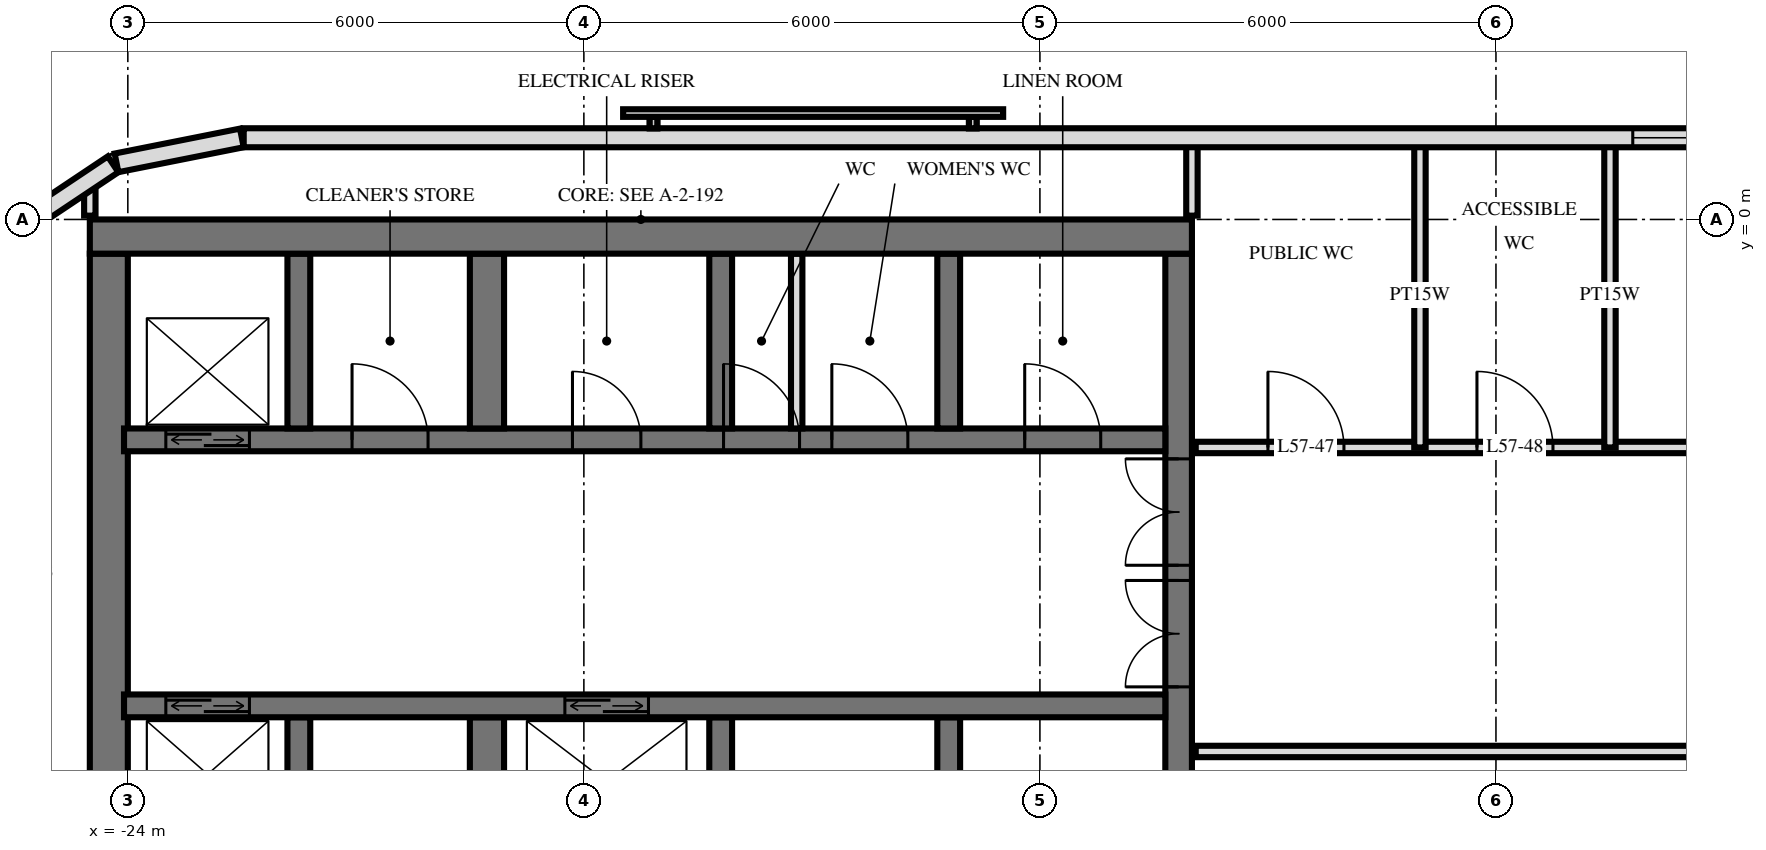
"""IFC4 building model, lengths in metres.
Left out: names, types, materials, properties, quantities, classifications, styles, units other than length and angle.
Written with IfcOpenShell. Run it as: python <this file> out.ifc"""

import sys

from ifc_helpers import new_model, si_unit, direction, frame, frame_2d, origin, place, context, subcontext, project, spatial, rectangle, extrude, element, fill, save


model = new_model("IFC4")
c1 = context("Model", 3, precision=1e-05, world=origin(), true_north=direction((0.0, 1.0)))
c2 = subcontext(c1, "Body", "Model", "MODEL_VIEW")
j1 = project(units=[si_unit("LENGTHUNIT", "METRE"), si_unit("PLANEANGLEUNIT", "RADIAN")], contexts=[c1])
p1 = place(None, origin())
s1 = spatial("IfcSite", under=j1, at=p1, CompositionType="ELEMENT")
p2 = place(p1, origin())
s2 = spatial("IfcBuilding", under=s1, at=p2, CompositionType="ELEMENT")
p3 = place(p2, frame((0.0, 0.0, 218.6)))
s3 = spatial("IfcBuildingStorey", under=s2, at=p3, CompositionType="ELEMENT", Elevation=218.6)
p4 = place(p3, frame((-24.5, -0.225, 0.0), z_axis=(0.0, 0.0, 1.0), x_axis=(1.0, 0.0, 0.0)))
e1 = element("IfcWall", 1, at=p4, inside=s3, PredefinedType="SHEAR", context=c2, shape_type="SweptSolid", body=[
    extrude(rectangle(XDim=14.5, YDim=0.45, at=frame_2d((7.25, 0.0))), origin(), (0.0, 0.0, 1.0), 3.5),
])
p5 = place(p3, frame((-10.175, -14.55, 0.0), z_axis=(0.0, 0.0, 1.0), x_axis=(0.0, 1.0, 0.0)))
e2 = element("IfcWall", 2, at=p5, inside=s3, PredefinedType="SHEAR", context=c2, shape_type="SweptSolid", body=[
    extrude(rectangle(XDim=14.1, YDim=0.35, at=frame_2d((7.05, 0.0))), origin(), (0.0, 0.0, 1.0), 3.5),
])
p6 = place(p5, frame((8.4, 0.0, 0.0)))
e3 = element("IfcOpeningElement", 3, at=p6, cuts=e2, PredefinedType="OPENING", context=c2, shape_type="SweptSolid", body=[
    extrude(rectangle(XDim=1.4, YDim=2.4, at=frame_2d((0.7, 1.2))), frame((0.0, 0.185, 0.0), z_axis=(0.0, -1.0, 0.0), x_axis=(1.0, 0.0, 0.0)), (0.0, 0.0, 1.0), 0.37),
])
p7 = place(p5, frame((10.0, 0.0, 0.0)))
e4 = element("IfcOpeningElement", 4, at=p7, cuts=e2, PredefinedType="OPENING", context=c2, shape_type="SweptSolid", body=[
    extrude(rectangle(XDim=1.4, YDim=2.4, at=frame_2d((0.7, 1.2))), frame((0.0, 0.185, 0.0), z_axis=(0.0, -1.0, 0.0), x_axis=(1.0, 0.0, 0.0)), (0.0, 0.0, 1.0), 0.37),
])
p8 = place(p5, frame((4.0, 0.0, 0.0)))
e5 = element("IfcOpeningElement", 5, at=p8, cuts=e2, PredefinedType="OPENING", context=c2, shape_type="SweptSolid", body=[
    extrude(rectangle(XDim=1.2, YDim=2.1, at=frame_2d((0.6, 1.05))), frame((0.0, 0.185, 0.0), z_axis=(0.0, -1.0, 0.0), x_axis=(1.0, 0.0, 0.0)), (0.0, 0.0, 1.0), 0.37),
])
p9 = place(p3, frame((-24.25, -14.55, 0.0), z_axis=(0.0, 0.0, 1.0), x_axis=(0.0, 1.0, 0.0)))
e6 = element("IfcWall", 6, at=p9, inside=s3, PredefinedType="SHEAR", context=c2, shape_type="SweptSolid", body=[
    extrude(rectangle(XDim=14.1, YDim=0.5, at=frame_2d((7.05, 0.0))), origin(), (0.0, 0.0, 1.0), 3.5),
])
p10 = place(p3, frame((-24.05, -2.9, 0.0), z_axis=(0.0, 0.0, 1.0), x_axis=(1.0, 0.0, 0.0)))
e7 = element("IfcWall", 7, at=p10, inside=s3, PredefinedType="SHEAR", context=c2, shape_type="SweptSolid", body=[
    extrude(rectangle(XDim=13.7, YDim=0.3, at=frame_2d((6.85, 0.0))), origin(), (0.0, 0.0, 1.0), 3.5),
])
p11 = place(p10, frame((0.55, 0.0, 0.0)))
e8 = element("IfcOpeningElement", 8, at=p11, cuts=e7, PredefinedType="OPENING", context=c2, shape_type="SweptSolid", body=[
    extrude(rectangle(XDim=1.1, YDim=2.1, at=frame_2d((0.55, 1.05))), frame((0.0, 0.16, 0.0), z_axis=(0.0, -1.0, 0.0), x_axis=(1.0, 0.0, 0.0)), (0.0, 0.0, 1.0), 0.32),
])
p12 = place(p10, frame((5.9, 0.0, 0.0)))
e9 = element("IfcOpeningElement", 9, at=p12, cuts=e7, PredefinedType="OPENING", context=c2, shape_type="SweptSolid", body=[
    extrude(rectangle(XDim=0.9, YDim=2.1, at=frame_2d((0.45, 1.05))), frame((0.0, 0.16, 0.0), z_axis=(0.0, -1.0, 0.0), x_axis=(1.0, 0.0, 0.0)), (0.0, 0.0, 1.0), 0.32),
])
p13 = place(p10, frame((11.85, 0.0, 0.0)))
e10 = element("IfcOpeningElement", 10, at=p13, cuts=e7, PredefinedType="OPENING", context=c2, shape_type="SweptSolid", body=[
    extrude(rectangle(XDim=1.0, YDim=2.1, at=frame_2d((0.5, 1.05))), frame((0.0, 0.16, 0.0), z_axis=(0.0, -1.0, 0.0), x_axis=(1.0, 0.0, 0.0)), (0.0, 0.0, 1.0), 0.32),
])
p14 = place(p10, frame((9.312, 0.0, 0.0)))
e11 = element("IfcOpeningElement", 11, at=p14, cuts=e7, PredefinedType="OPENING", context=c2, shape_type="SweptSolid", body=[
    extrude(rectangle(XDim=1.0, YDim=2.1, at=frame_2d((0.5, 1.05))), frame((0.0, 0.16, 0.0), z_axis=(0.0, -1.0, 0.0), x_axis=(1.0, 0.0, 0.0)), (0.0, 0.0, 1.0), 0.32),
])
p15 = place(p10, frame((7.887, 0.0, 0.0)))
e12 = element("IfcOpeningElement", 12, at=p15, cuts=e7, PredefinedType="OPENING", context=c2, shape_type="SweptSolid", body=[
    extrude(rectangle(XDim=1.0, YDim=2.1, at=frame_2d((0.5, 1.05))), frame((0.0, 0.16, 0.0), z_axis=(0.0, -1.0, 0.0), x_axis=(1.0, 0.0, 0.0)), (0.0, 0.0, 1.0), 0.32),
])
p16 = place(p10, frame((3.0, 0.0, 0.0)))
e13 = element("IfcOpeningElement", 13, at=p16, cuts=e7, PredefinedType="OPENING", context=c2, shape_type="SweptSolid", body=[
    extrude(rectangle(XDim=1.0, YDim=2.1, at=frame_2d((0.5, 1.05))), frame((0.0, 0.16, 0.0), z_axis=(0.0, -1.0, 0.0), x_axis=(1.0, 0.0, 0.0)), (0.0, 0.0, 1.0), 0.32),
])
p17 = place(p3, frame((-24.05, -6.4, 0.0), z_axis=(0.0, 0.0, 1.0), x_axis=(1.0, 0.0, 0.0)))
e14 = element("IfcWall", 14, at=p17, inside=s3, PredefinedType="SHEAR", context=c2, shape_type="SweptSolid", body=[
    extrude(rectangle(XDim=13.7, YDim=0.3, at=frame_2d((6.85, 0.0))), origin(), (0.0, 0.0, 1.0), 3.5),
])
p18 = place(p17, frame((0.55, 0.0, 0.0)))
e15 = element("IfcOpeningElement", 15, at=p18, cuts=e14, PredefinedType="OPENING", context=c2, shape_type="SweptSolid", body=[
    extrude(rectangle(XDim=1.1, YDim=2.1, at=frame_2d((0.55, 1.05))), frame((0.0, 0.16, 0.0), z_axis=(0.0, -1.0, 0.0), x_axis=(1.0, 0.0, 0.0)), (0.0, 0.0, 1.0), 0.32),
])
p19 = place(p17, frame((5.8, 0.0, 0.0)))
e16 = element("IfcOpeningElement", 16, at=p19, cuts=e14, PredefinedType="OPENING", context=c2, shape_type="SweptSolid", body=[
    extrude(rectangle(XDim=1.1, YDim=2.1, at=frame_2d((0.55, 1.05))), frame((0.0, 0.16, 0.0), z_axis=(0.0, -1.0, 0.0), x_axis=(1.0, 0.0, 0.0)), (0.0, 0.0, 1.0), 0.32),
])
for number, where, z_axis, x_axis in (
    (17, (-13.2, -2.75, 0.0), (0.0, 0.0, 1.0), (0.0, 1.0, 0.0)),
    (18, (-13.2, -8.85, 0.0), (0.0, 0.0, 1.0), (0.0, 1.0, 0.0)),
    (19, (-16.2, -2.75, 0.0), (0.0, 0.0, 1.0), (0.0, 1.0, 0.0)),
    (20, (-16.2, -8.85, 0.0), (0.0, 0.0, 1.0), (0.0, 1.0, 0.0)),
):
    element("IfcWall", number, at=place(p3, frame(where, z_axis=z_axis, x_axis=x_axis)), inside=s3, PredefinedType="SHEAR", context=c2, shape_type="SweptSolid", body=[
        extrude(rectangle(XDim=2.3, YDim=0.3, at=frame_2d((1.15, 0.0))), origin(), (0.0, 0.0, 1.0), 3.5),
    ])
for number, where, z_axis, x_axis in (
    (21, (-19.275, -2.75, 0.0), (0.0, 0.0, 1.0), (0.0, 1.0, 0.0)),
    (22, (-19.275, -8.85, 0.0), (0.0, 0.0, 1.0), (0.0, 1.0, 0.0)),
):
    element("IfcWall", number, at=place(p3, frame(where, z_axis=z_axis, x_axis=x_axis)), inside=s3, PredefinedType="SHEAR", context=c2, shape_type="SweptSolid", body=[
        extrude(rectangle(XDim=2.3, YDim=0.45, at=frame_2d((1.15, 0.0))), origin(), (0.0, 0.0, 1.0), 3.5),
    ])
for number, where, z_axis, x_axis in (
    (23, (-21.75, -2.75, 0.0), (0.0, 0.0, 1.0), (0.0, 1.0, 0.0)),
    (24, (-21.75, -8.85, 0.0), (0.0, 0.0, 1.0), (0.0, 1.0, 0.0)),
):
    element("IfcWall", number, at=place(p3, frame(where, z_axis=z_axis, x_axis=x_axis)), inside=s3, PredefinedType="SHEAR", context=c2, shape_type="SweptSolid", body=[
        extrude(rectangle(XDim=2.3, YDim=0.3, at=frame_2d((1.15, 0.0))), origin(), (0.0, 0.0, 1.0), 3.5),
    ])
p20 = place(p3, frame((22.475, 1.075, 0.0), z_axis=(0.0, 0.0, 1.0), x_axis=(-1.0, 0.0, 0.0)))
e25 = element("IfcWall", 25, at=p20, inside=s3, PredefinedType="SOLIDWALL", context=c2, shape_type="SweptSolid", body=[
    extrude(rectangle(XDim=44.951, YDim=0.25, at=frame_2d((22.475, 0.0))), origin(), (0.0, 0.0, 1.0), 3.22),
])
p21 = place(p20, frame((15.275, 0.0, 0.9)))
e26 = element("IfcOpeningElement", 26, at=p21, cuts=e25, PredefinedType="OPENING", context=c2, shape_type="SweptSolid", body=[
    extrude(rectangle(XDim=2.4, YDim=1.5, at=frame_2d((1.2, 0.75))), frame((0.0, 0.135, 0.0), z_axis=(0.0, -1.0, 0.0), x_axis=(1.0, 0.0, 0.0)), (0.0, 0.0, 1.0), 0.27),
])
p22 = place(p20, frame((18.275, 0.0, 0.9)))
e27 = element("IfcOpeningElement", 27, at=p22, cuts=e25, PredefinedType="OPENING", context=c2, shape_type="SweptSolid", body=[
    extrude(rectangle(XDim=2.4, YDim=1.5, at=frame_2d((1.2, 0.75))), frame((0.0, 0.135, 0.0), z_axis=(0.0, -1.0, 0.0), x_axis=(1.0, 0.0, 0.0)), (0.0, 0.0, 1.0), 0.27),
])
p23 = place(p20, frame((21.275, 0.0, 0.9)))
e28 = element("IfcOpeningElement", 28, at=p23, cuts=e25, PredefinedType="OPENING", context=c2, shape_type="SweptSolid", body=[
    extrude(rectangle(XDim=2.4, YDim=1.5, at=frame_2d((1.2, 0.75))), frame((0.0, 0.135, 0.0), z_axis=(0.0, -1.0, 0.0), x_axis=(1.0, 0.0, 0.0)), (0.0, 0.0, 1.0), 0.27),
])
p24 = place(p20, frame((24.275, 0.0, 0.9)))
e29 = element("IfcOpeningElement", 29, at=p24, cuts=e25, PredefinedType="OPENING", context=c2, shape_type="SweptSolid", body=[
    extrude(rectangle(XDim=2.4, YDim=1.5, at=frame_2d((1.2, 0.75))), frame((0.0, 0.135, 0.0), z_axis=(0.0, -1.0, 0.0), x_axis=(1.0, 0.0, 0.0)), (0.0, 0.0, 1.0), 0.27),
])
p25 = place(p3, frame((-22.5, 1.073, 0.0), z_axis=(0.0, 0.0, 1.0), x_axis=(-0.980803419081, -0.194999110559, 0.0)))
e30 = element("IfcWall", 30, at=p25, inside=s3, PredefinedType="SOLIDWALL", context=c2, shape_type="SweptSolid", body=[
    extrude(rectangle(XDim=1.681, YDim=0.25, at=frame_2d((0.841, 0.0))), origin(), (0.0, 0.0, 1.0), 3.22),
])
p26 = place(p3, frame((-24.194, 0.726, 0.0), z_axis=(0.0, 0.0, 1.0), x_axis=(-0.831482937015, -0.55555029066, 0.0)))
e31 = element("IfcWall", 31, at=p26, inside=s3, PredefinedType="SOLIDWALL", context=c2, shape_type="SweptSolid", body=[
    extrude(rectangle(XDim=1.656, YDim=0.25, at=frame_2d((0.828, 0.0))), origin(), (0.0, 0.0, 1.0), 3.22),
])
p27 = place(p3, frame((-15.2, -2.75, 0.0), z_axis=(0.0, 0.0, 1.0), x_axis=(0.0, 1.0, 0.0)))
e32 = element("IfcWall", 32, at=p27, inside=s3, PredefinedType="PARTITIONING", context=c2, shape_type="SweptSolid", body=[
    extrude(rectangle(XDim=2.3, YDim=0.15, at=frame_2d((1.15, 0.0))), origin(), (0.0, 0.0, 1.0), 3.2),
])
for number, where, z_axis, x_axis in (
    (33, (-4.5, -3.0, 0.0), (0.0, 0.0, 1.0), (0.0, 1.0, 0.0)),
    (34, (-7.0, -3.0, 0.0), (0.0, 0.0, 1.0), (0.0, 1.0, 0.0)),
):
    element("IfcWall", number, at=place(p3, frame(where, z_axis=z_axis, x_axis=x_axis)), inside=s3, PredefinedType="PLUMBINGWALL", context=c2, shape_type="SweptSolid", body=[
        extrude(rectangle(XDim=4.02, YDim=0.15, at=frame_2d((2.01, 0.0))), origin(), (0.0, 0.0, 1.0), 3.22),
    ])
p28 = place(p3, frame((-10.0, 0.05, 0.0), z_axis=(0.0, 0.0, 1.0), x_axis=(0.0, 1.0, 0.0)))
e35 = element("IfcWall", 35, at=p28, inside=s3, PredefinedType="PLUMBINGWALL", context=c2, shape_type="SweptSolid", body=[
    extrude(rectangle(XDim=0.97, YDim=0.15, at=frame_2d((0.485, 0.0))), origin(), (0.0, 0.0, 1.0), 3.22),
])
p29 = place(p3, frame((-24.5, 0.05, 0.0), z_axis=(0.0, 0.0, 1.0), x_axis=(0.0, 1.0, 0.0)))
e36 = element("IfcWall", 36, at=p29, inside=s3, PredefinedType="PARTITIONING", context=c2, shape_type="SweptSolid", body=[
    extrude(rectangle(XDim=0.405, YDim=0.15, at=frame_2d((0.203, 0.0))), origin(), (0.0, 0.0, 1.0), 3.22),
])
p30 = place(p3, frame((-9.95, -7.0, 0.0), z_axis=(0.0, 0.0, 1.0), x_axis=(1.0, 0.0, 0.0)))
e37 = element("IfcWall", 37, at=p30, inside=s3, PredefinedType="PARTITIONING", context=c2, shape_type="SweptSolid", body=[
    extrude(rectangle(XDim=19.9, YDim=0.15, at=frame_2d((9.95, 0.0))), origin(), (0.0, 0.0, 1.0), 3.22),
])
p31 = place(p30, frame((9.45, 0.0, 0.0)))
e38 = element("IfcOpeningElement", 38, at=p31, cuts=e37, PredefinedType="OPENING", context=c2, shape_type="SweptSolid", body=[
    extrude(rectangle(XDim=1.0, YDim=2.1, at=frame_2d((0.5, 1.05))), frame((0.0, 0.085, 0.0), z_axis=(0.0, -1.0, 0.0), x_axis=(1.0, 0.0, 0.0)), (0.0, 0.0, 1.0), 0.17),
])
p32 = place(p30, frame((15.45, 0.0, 0.0)))
e39 = element("IfcOpeningElement", 39, at=p32, cuts=e37, PredefinedType="OPENING", context=c2, shape_type="SweptSolid", body=[
    extrude(rectangle(XDim=1.0, YDim=2.1, at=frame_2d((0.5, 1.05))), frame((0.0, 0.085, 0.0), z_axis=(0.0, -1.0, 0.0), x_axis=(1.0, 0.0, 0.0)), (0.0, 0.0, 1.0), 0.17),
])
p33 = place(p3, frame((-9.95, -3.0, 0.0), z_axis=(0.0, 0.0, 1.0), x_axis=(1.0, 0.0, 0.0)))
e40 = element("IfcWall", 40, at=p33, inside=s3, PredefinedType="PARTITIONING", context=c2, shape_type="SweptSolid", body=[
    extrude(rectangle(XDim=19.9, YDim=0.15, at=frame_2d((9.95, 0.0))), origin(), (0.0, 0.0, 1.0), 3.22),
])
p34 = place(p33, frame((0.95, 0.0, 0.0)))
e41 = element("IfcOpeningElement", 41, at=p34, cuts=e40, PredefinedType="OPENING", context=c2, shape_type="SweptSolid", body=[
    extrude(rectangle(XDim=1.0, YDim=2.1, at=frame_2d((0.5, 1.05))), frame((0.0, 0.085, 0.0), z_axis=(0.0, -1.0, 0.0), x_axis=(1.0, 0.0, 0.0)), (0.0, 0.0, 1.0), 0.17),
])
p35 = place(p33, frame((3.7, 0.0, 0.0)))
e42 = element("IfcOpeningElement", 42, at=p35, cuts=e40, PredefinedType="OPENING", context=c2, shape_type="SweptSolid", body=[
    extrude(rectangle(XDim=1.0, YDim=2.1, at=frame_2d((0.5, 1.05))), frame((0.0, 0.085, 0.0), z_axis=(0.0, -1.0, 0.0), x_axis=(1.0, 0.0, 0.0)), (0.0, 0.0, 1.0), 0.17),
])
p36 = place(p33, frame((7.95, 0.0, 0.0)))
e43 = element("IfcOpeningElement", 43, at=p36, cuts=e40, PredefinedType="OPENING", context=c2, shape_type="SweptSolid", body=[
    extrude(rectangle(XDim=1.0, YDim=2.1, at=frame_2d((0.5, 1.05))), frame((0.0, 0.085, 0.0), z_axis=(0.0, -1.0, 0.0), x_axis=(1.0, 0.0, 0.0)), (0.0, 0.0, 1.0), 0.17),
])
p37 = place(p33, frame((15.2, 0.0, 0.0)))
e44 = element("IfcOpeningElement", 44, at=p37, cuts=e40, PredefinedType="OPENING", context=c2, shape_type="SweptSolid", body=[
    extrude(rectangle(XDim=1.0, YDim=2.1, at=frame_2d((0.5, 1.05))), frame((0.0, 0.085, 0.0), z_axis=(0.0, -1.0, 0.0), x_axis=(1.0, 0.0, 0.0)), (0.0, 0.0, 1.0), 0.17),
])
p38 = place(p24, origin())
e45 = element("IfcWindow", 45, at=p38, inside=s3, PartitioningType="SINGLE_PANEL", PredefinedType="WINDOW", context=c2, shape_type="SweptSolid", body=[
    extrude(rectangle(XDim=2.4, YDim=1.5, at=frame_2d((1.2, 0.75))), frame((0.0, 0.03, 0.0), z_axis=(0.0, -1.0, 0.0), x_axis=(1.0, 0.0, 0.0)), (0.0, 0.0, 1.0), 0.06),
])
fill(e29, e45)
p39 = place(p11, origin())
e46 = element("IfcDoor", 46, at=p39, inside=s3, OperationType="DOUBLE_DOOR_SLIDING", PredefinedType="USERDEFINED", context=c2, shape_type="SweptSolid", body=[
    extrude(rectangle(XDim=1.1, YDim=2.1, at=frame_2d((0.55, 1.05))), frame((0.0, 0.025, 0.0), z_axis=(0.0, -1.0, 0.0), x_axis=(1.0, 0.0, 0.0)), (0.0, 0.0, 1.0), 0.05),
])
fill(e8, e46)
p40 = place(p18, origin())
e47 = element("IfcDoor", 47, at=p40, inside=s3, OperationType="DOUBLE_DOOR_SLIDING", PredefinedType="USERDEFINED", context=c2, shape_type="SweptSolid", body=[
    extrude(rectangle(XDim=1.1, YDim=2.1, at=frame_2d((0.55, 1.05))), frame((0.0, 0.025, 0.0), z_axis=(0.0, -1.0, 0.0), x_axis=(1.0, 0.0, 0.0)), (0.0, 0.0, 1.0), 0.05),
])
fill(e15, e47)
p41 = place(p19, origin())
e48 = element("IfcDoor", 48, at=p41, inside=s3, OperationType="DOUBLE_DOOR_SLIDING", PredefinedType="USERDEFINED", context=c2, shape_type="SweptSolid", body=[
    extrude(rectangle(XDim=1.1, YDim=2.1, at=frame_2d((0.55, 1.05))), frame((0.0, 0.025, 0.0), z_axis=(0.0, -1.0, 0.0), x_axis=(1.0, 0.0, 0.0)), (0.0, 0.0, 1.0), 0.05),
])
fill(e16, e48)
p42 = place(p6, origin())
e49 = element("IfcDoor", 49, at=p42, inside=s3, OperationType="DOUBLE_DOOR_SINGLE_SWING", PredefinedType="DOOR", context=c2, shape_type="SweptSolid", body=[
    extrude(rectangle(XDim=1.4, YDim=2.4, at=frame_2d((0.7, 1.2))), frame((0.0, 0.025, 0.0), z_axis=(0.0, -1.0, 0.0), x_axis=(1.0, 0.0, 0.0)), (0.0, 0.0, 1.0), 0.05),
])
fill(e3, e49)
p43 = place(p7, origin())
e50 = element("IfcDoor", 50, at=p43, inside=s3, OperationType="DOUBLE_DOOR_SINGLE_SWING", PredefinedType="DOOR", context=c2, shape_type="SweptSolid", body=[
    extrude(rectangle(XDim=1.4, YDim=2.4, at=frame_2d((0.7, 1.2))), frame((0.0, 0.025, 0.0), z_axis=(0.0, -1.0, 0.0), x_axis=(1.0, 0.0, 0.0)), (0.0, 0.0, 1.0), 0.05),
])
fill(e4, e50)
p44 = place(p12, origin())
e51 = element("IfcDoor", 51, at=p44, inside=s3, OperationType="SINGLE_SWING_RIGHT", PredefinedType="DOOR", context=c2, shape_type="SweptSolid", body=[
    extrude(rectangle(XDim=0.9, YDim=2.1, at=frame_2d((0.45, 1.05))), frame((0.0, 0.025, 0.0), z_axis=(0.0, -1.0, 0.0), x_axis=(1.0, 0.0, 0.0)), (0.0, 0.0, 1.0), 0.05),
])
fill(e9, e51)
p45 = place(p13, origin())
e52 = element("IfcDoor", 52, at=p45, inside=s3, OperationType="SINGLE_SWING_RIGHT", PredefinedType="DOOR", context=c2, shape_type="SweptSolid", body=[
    extrude(rectangle(XDim=1.0, YDim=2.1, at=frame_2d((0.5, 1.05))), frame((0.0, 0.025, 0.0), z_axis=(0.0, -1.0, 0.0), x_axis=(1.0, 0.0, 0.0)), (0.0, 0.0, 1.0), 0.05),
])
fill(e10, e52)
p46 = place(p14, origin())
e53 = element("IfcDoor", 53, at=p46, inside=s3, OperationType="SINGLE_SWING_RIGHT", PredefinedType="DOOR", context=c2, shape_type="SweptSolid", body=[
    extrude(rectangle(XDim=1.0, YDim=2.1, at=frame_2d((0.5, 1.05))), frame((0.0, 0.025, 0.0), z_axis=(0.0, -1.0, 0.0), x_axis=(1.0, 0.0, 0.0)), (0.0, 0.0, 1.0), 0.05),
])
fill(e11, e53)
p47 = place(p15, origin())
e54 = element("IfcDoor", 54, at=p47, inside=s3, OperationType="SINGLE_SWING_RIGHT", PredefinedType="DOOR", context=c2, shape_type="SweptSolid", body=[
    extrude(rectangle(XDim=1.0, YDim=2.1, at=frame_2d((0.5, 1.05))), frame((0.0, 0.025, 0.0), z_axis=(0.0, -1.0, 0.0), x_axis=(1.0, 0.0, 0.0)), (0.0, 0.0, 1.0), 0.05),
])
fill(e12, e54)
p48 = place(p16, origin())
e55 = element("IfcDoor", 55, at=p48, inside=s3, OperationType="SINGLE_SWING_RIGHT", PredefinedType="DOOR", context=c2, shape_type="SweptSolid", body=[
    extrude(rectangle(XDim=1.0, YDim=2.1, at=frame_2d((0.5, 1.05))), frame((0.0, 0.025, 0.0), z_axis=(0.0, -1.0, 0.0), x_axis=(1.0, 0.0, 0.0)), (0.0, 0.0, 1.0), 0.05),
])
fill(e13, e55)
p49 = place(p34, origin())
e56 = element("IfcDoor", 56, at=p49, inside=s3, OperationType="SINGLE_SWING_RIGHT", PredefinedType="DOOR", context=c2, shape_type="SweptSolid", body=[
    extrude(rectangle(XDim=1.0, YDim=2.1, at=frame_2d((0.5, 1.05))), frame((0.0, 0.025, 0.0), z_axis=(0.0, -1.0, 0.0), x_axis=(1.0, 0.0, 0.0)), (0.0, 0.0, 1.0), 0.05),
])
fill(e41, e56)
p50 = place(p35, origin())
e57 = element("IfcDoor", 57, at=p50, inside=s3, OperationType="SINGLE_SWING_RIGHT", PredefinedType="DOOR", context=c2, shape_type="SweptSolid", body=[
    extrude(rectangle(XDim=1.0, YDim=2.1, at=frame_2d((0.5, 1.05))), frame((0.0, 0.025, 0.0), z_axis=(0.0, -1.0, 0.0), x_axis=(1.0, 0.0, 0.0)), (0.0, 0.0, 1.0), 0.05),
])
fill(e42, e57)
save(model, sys.argv[1])
